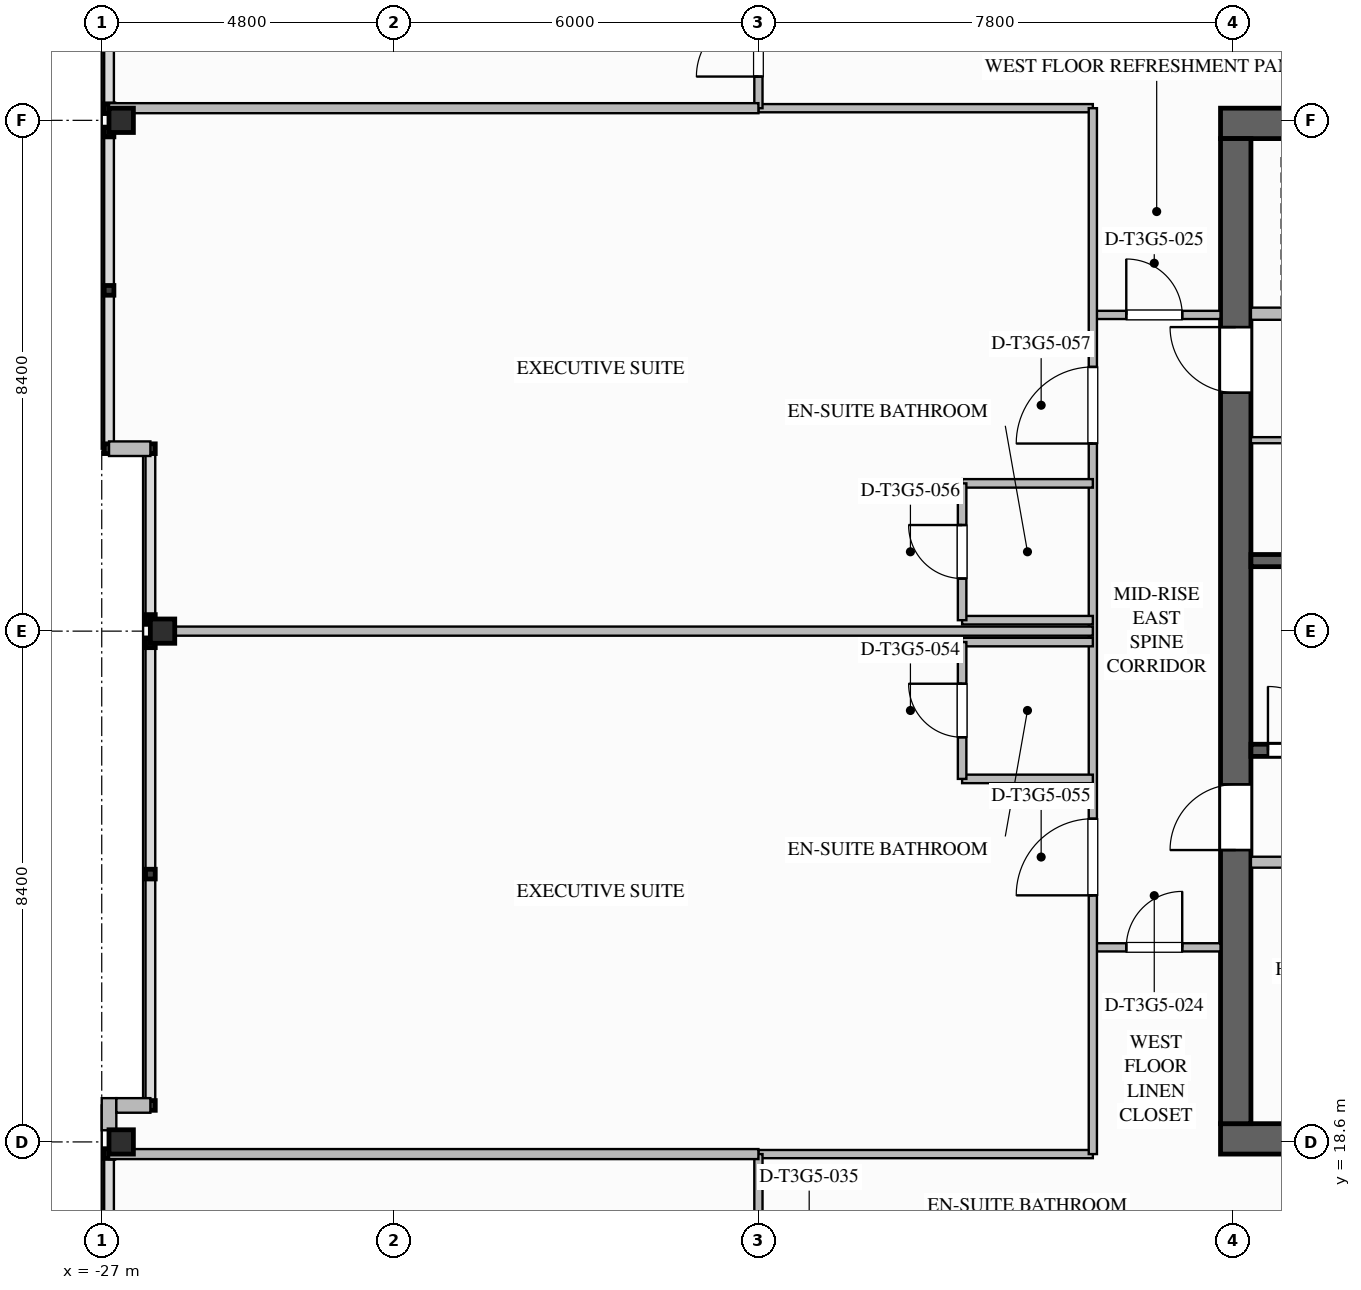
"""IFC4 building model, lengths in metres.
Left out: names, types, materials, properties, quantities, classifications, styles, units other than length and angle.
Written with IfcOpenShell. Run it as: python <this file> out.ifc"""

import sys

from ifc_helpers import new_model, si_unit, direction, frame, frame_2d, origin, origin_2d, place, context, subcontext, project, spatial, rectangle, i_section, extrude, element, fill, save


model = new_model("IFC4")
c1 = context("Model", 3, precision=1e-05, world=origin(), true_north=direction((0.0, 1.0)))
c2 = subcontext(c1, "Body", "Model", "MODEL_VIEW")
j1 = project(units=[si_unit("LENGTHUNIT", "METRE"), si_unit("PLANEANGLEUNIT", "RADIAN")], contexts=[c1])
p1 = place(None, origin())
s1 = spatial("IfcSite", under=j1, at=p1, CompositionType="ELEMENT")
p2 = place(p1, origin())
s2 = spatial("IfcBuilding", under=s1, at=p2, CompositionType="ELEMENT")
p3 = place(p2, frame((0.0, 0.0, 193.0)))
s3 = spatial("IfcBuildingStorey", under=s2, at=p3, CompositionType="ELEMENT", Elevation=193.0)
for number, where, z_axis, x_axis in (
    (1, (-8.6, 35.35, 0.0), (0.0, 0.0, 1.0), (1.0, 0.0, 0.0)),
    (2, (8.6, 18.65, 0.0), (0.0, 0.0, 1.0), (-1.0, 0.0, 0.0)),
):
    element("IfcWall", number, at=place(p3, frame(where, z_axis=z_axis, x_axis=x_axis)), inside=s3, PredefinedType="SHEAR", context=c2, shape_type="SweptSolid", body=[
        extrude(rectangle(XDim=17.2, YDim=0.5, at=frame_2d((8.6, 0.0))), origin(), (0.0, 0.0, 1.0), 3.55),
    ])
p4 = place(p3, frame((-8.35, 18.9, 0.0), z_axis=(0.0, 0.0, 1.0), x_axis=(0.0, 1.0, 0.0)))
e3 = element("IfcWall", 3, at=p4, inside=s3, PredefinedType="SHEAR", context=c2, shape_type="SweptSolid", body=[
    extrude(rectangle(XDim=16.2, YDim=0.5, at=frame_2d((8.1, 0.0))), origin(), (0.0, 0.0, 1.0), 3.55),
])
p5 = place(p4, frame((12.02, 0.0, 0.0)))
e4 = element("IfcOpeningElement", 4, at=p5, cuts=e3, PredefinedType="OPENING", context=c2, shape_type="SweptSolid", body=[
    extrude(rectangle(XDim=1.08, YDim=2.04, at=frame_2d((0.54, 1.02))), frame((0.0, 0.26, 0.0), z_axis=(0.0, -1.0, 0.0), x_axis=(1.0, 0.0, 0.0)), (0.0, 0.0, 1.0), 0.52),
])
p6 = place(p4, frame((4.5, 0.0, 0.0)))
e5 = element("IfcOpeningElement", 5, at=p6, cuts=e3, PredefinedType="OPENING", context=c2, shape_type="SweptSolid", body=[
    extrude(rectangle(XDim=1.08, YDim=2.04, at=frame_2d((0.54, 1.02))), frame((0.0, 0.26, 0.0), z_axis=(0.0, -1.0, 0.0), x_axis=(1.0, 0.0, 0.0)), (0.0, 0.0, 1.0), 0.52),
])
for number, where, z_axis, x_axis in (
    (6, (-26.68, 18.6, 0.0), (0.0, 0.0, 1.0), (1.0, 0.0, 0.0)),
    (7, (-26.0, 27.0, 0.0), (0.0, 0.0, 1.0), (1.0, 0.0, 0.0)),
    (8, (-26.68, 35.4, 0.0), (0.0, 0.0, 1.0), (1.0, 0.0, 0.0)),
):
    element("IfcColumn", number, at=place(p3, frame(where, z_axis=z_axis, x_axis=x_axis)), inside=s3, PredefinedType="COLUMN", context=c2, shape_type="SweptSolid", body=[
        extrude(i_section(OverallWidth=0.401, OverallDepth=0.399, WebThickness=0.025, FlangeThickness=0.04, FilletRadius=0.025, at=origin_2d()), origin(), (0.0, 0.0, 1.0), 3.547),
    ])
p7 = place(p3, frame((-26.88, 18.792, 0.0), z_axis=(0.0, 0.0, 1.0), x_axis=(0.0, 1.0, 0.0)))
e9 = element("IfcWall", 9, at=p7, inside=s3, PredefinedType="STANDARD", context=c2, shape_type="SweptSolid", body=[
    extrude(rectangle(XDim=0.528, YDim=0.24, at=frame_2d((0.264, 0.0))), origin(), (0.0, 0.0, 1.0), 3.29),
])
p8 = place(p3, frame((-26.76, 19.2, 0.0), z_axis=(0.0, 0.0, 1.0), x_axis=(1.0, 0.0, 0.0)))
e10 = element("IfcWall", 10, at=p8, inside=s3, PredefinedType="STANDARD", context=c2, shape_type="SweptSolid", body=[
    extrude(rectangle(XDim=0.56, YDim=0.24, at=frame_2d((0.28, 0.0))), origin(), (0.0, 0.0, 1.0), 3.29),
])
p9 = place(p3, frame((-26.2, 30.0, 0.0), z_axis=(0.0, 0.0, 1.0), x_axis=(-1.0, 0.0, 0.0)))
e11 = element("IfcWall", 11, at=p9, inside=s3, PredefinedType="STANDARD", context=c2, shape_type="SweptSolid", body=[
    extrude(rectangle(XDim=0.68, YDim=0.24, at=frame_2d((0.34, 0.0))), origin(), (0.0, 0.0, 1.0), 3.29),
])
p10 = place(p3, frame((-8.1, 25.04, 0.0), z_axis=(0.0, 0.0, 1.0), x_axis=(1.0, 0.0, 0.0)))
e12 = element("IfcWall", 12, at=p10, inside=s3, PredefinedType="SOLIDWALL", context=c2, shape_type="SweptSolid", body=[
    extrude(rectangle(XDim=8.1, YDim=0.2, at=frame_2d((4.05, 0.0))), origin(), (0.0, 0.0, 1.0), 3.29),
])
p11 = place(p10, frame((0.28, 0.0, 0.0)))
e13 = element("IfcOpeningElement", 13, at=p11, cuts=e12, PredefinedType="OPENING", context=c2, shape_type="SweptSolid", body=[
    extrude(rectangle(XDim=1.05, YDim=2.1, at=frame_2d((0.525, 1.05))), frame((0.0, 0.11, 0.0), z_axis=(0.0, -1.0, 0.0), x_axis=(1.0, 0.0, 0.0)), (0.0, 0.0, 1.0), 0.22),
])
p12 = place(p3, frame((-8.1, 28.16, 0.0), z_axis=(0.0, 0.0, 1.0), x_axis=(1.0, 0.0, 0.0)))
e14 = element("IfcWall", 14, at=p12, inside=s3, PredefinedType="SOLIDWALL", context=c2, shape_type="SweptSolid", body=[
    extrude(rectangle(XDim=8.1, YDim=0.2, at=frame_2d((4.05, 0.0))), origin(), (0.0, 0.0, 1.0), 3.29),
])
p13 = place(p3, frame((-8.1, 32.22, 0.0), z_axis=(0.0, 0.0, 1.0), x_axis=(1.0, 0.0, 0.0)))
e15 = element("IfcWall", 15, at=p13, inside=s3, PredefinedType="SOLIDWALL", context=c2, shape_type="SweptSolid", body=[
    extrude(rectangle(XDim=7.1, YDim=0.2, at=frame_2d((3.55, 0.0))), origin(), (0.0, 0.0, 1.0), 3.29),
])
p14 = place(p13, frame((0.95, 0.0, 0.0)))
e16 = element("IfcOpeningElement", 16, at=p14, cuts=e15, PredefinedType="OPENING", context=c2, shape_type="SweptSolid", body=[
    extrude(rectangle(XDim=1.1, YDim=2.2, at=frame_2d((0.55, 1.1))), frame((0.0, 0.11, 0.0), z_axis=(0.0, -1.0, 0.0), x_axis=(1.0, 0.0, 0.0)), (0.0, 0.0, 1.0), 0.22),
])
p15 = place(p13, frame((3.27, 0.0, 0.0)))
e17 = element("IfcOpeningElement", 17, at=p15, cuts=e15, PredefinedType="OPENING", context=c2, shape_type="SweptSolid", body=[
    extrude(rectangle(XDim=1.1, YDim=2.2, at=frame_2d((0.55, 1.1))), frame((0.0, 0.11, 0.0), z_axis=(0.0, -1.0, 0.0), x_axis=(1.0, 0.0, 0.0)), (0.0, 0.0, 1.0), 0.22),
])
p16 = place(p13, frame((5.59, 0.0, 0.0)))
e18 = element("IfcOpeningElement", 18, at=p16, cuts=e15, PredefinedType="OPENING", context=c2, shape_type="SweptSolid", body=[
    extrude(rectangle(XDim=1.1, YDim=2.2, at=frame_2d((0.55, 1.1))), frame((0.0, 0.11, 0.0), z_axis=(0.0, -1.0, 0.0), x_axis=(1.0, 0.0, 0.0)), (0.0, 0.0, 1.0), 0.22),
])
p17 = place(p3, frame((-8.1, 30.14, 0.0), z_axis=(0.0, 0.0, 1.0), x_axis=(1.0, 0.0, 0.0)))
e19 = element("IfcWall", 19, at=p17, inside=s3, PredefinedType="PARTITIONING", context=c2, shape_type="SweptSolid", body=[
    extrude(rectangle(XDim=7.1, YDim=0.1, at=frame_2d((3.55, 0.0))), origin(), (0.0, 0.0, 1.0), 3.29),
])
p18 = place(p17, frame((0.55, 0.0, 0.0)))
e20 = element("IfcOpeningElement", 20, at=p18, cuts=e19, PredefinedType="OPENING", context=c2, shape_type="SweptSolid", body=[
    extrude(rectangle(XDim=0.88, YDim=2.1, at=frame_2d((0.44, 1.05))), frame((0.0, 0.06, 0.0), z_axis=(0.0, -1.0, 0.0), x_axis=(1.0, 0.0, 0.0)), (0.0, 0.0, 1.0), 0.12),
])
p19 = place(p17, frame((3.6, 0.0, 0.0)))
e21 = element("IfcOpeningElement", 21, at=p19, cuts=e19, PredefinedType="OPENING", context=c2, shape_type="SweptSolid", body=[
    extrude(rectangle(XDim=0.92, YDim=2.1, at=frame_2d((0.46, 1.05))), frame((0.0, 0.06, 0.0), z_axis=(0.0, -1.0, 0.0), x_axis=(1.0, 0.0, 0.0)), (0.0, 0.0, 1.0), 0.12),
])
p20 = place(p3, frame((-8.1, 23.2, 0.0), z_axis=(0.0, 0.0, 1.0), x_axis=(1.0, 0.0, 0.0)))
e22 = element("IfcWall", 22, at=p20, inside=s3, PredefinedType="SOLIDWALL", context=c2, shape_type="SweptSolid", body=[
    extrude(rectangle(XDim=8.65, YDim=0.18, at=frame_2d((4.325, 0.0))), origin(), (0.0, 0.0, 1.0), 3.29),
])
p21 = place(p20, frame((1.0, 0.0, 0.0)))
e23 = element("IfcOpeningElement", 23, at=p21, cuts=e22, PredefinedType="OPENING", context=c2, shape_type="SweptSolid", body=[
    extrude(rectangle(XDim=1.0, YDim=2.1, at=frame_2d((0.5, 1.05))), frame((0.0, 0.1, 0.0), z_axis=(0.0, -1.0, 0.0), x_axis=(1.0, 0.0, 0.0)), (0.0, 0.0, 1.0), 0.2),
])
p22 = place(p20, frame((4.0, 0.0, 0.0)))
e24 = element("IfcOpeningElement", 24, at=p22, cuts=e22, PredefinedType="OPENING", context=c2, shape_type="SweptSolid", body=[
    extrude(rectangle(XDim=1.0, YDim=2.1, at=frame_2d((0.5, 1.05))), frame((0.0, 0.1, 0.0), z_axis=(0.0, -1.0, 0.0), x_axis=(1.0, 0.0, 0.0)), (0.0, 0.0, 1.0), 0.2),
])
p23 = place(p20, frame((6.8, 0.0, 0.0)))
e25 = element("IfcOpeningElement", 25, at=p23, cuts=e22, PredefinedType="OPENING", context=c2, shape_type="SweptSolid", body=[
    extrude(rectangle(XDim=1.0, YDim=2.1, at=frame_2d((0.5, 1.05))), frame((0.0, 0.1, 0.0), z_axis=(0.0, -1.0, 0.0), x_axis=(1.0, 0.0, 0.0)), (0.0, 0.0, 1.0), 0.2),
])
p24 = place(p3, frame((-10.7, 21.8, 0.0), z_axis=(0.0, 0.0, 1.0), x_axis=(1.0, 0.0, 0.0)))
e26 = element("IfcWall", 26, at=p24, inside=s3, PredefinedType="PARTITIONING", context=c2, shape_type="SweptSolid", body=[
    extrude(rectangle(XDim=2.1, YDim=0.135, at=frame_2d((1.05, 0.0))), origin(), (0.0, 0.0, 1.0), 3.29),
])
p25 = place(p24, frame((0.55, 0.0, 0.0)))
e27 = element("IfcOpeningElement", 27, at=p25, cuts=e26, PredefinedType="OPENING", context=c2, shape_type="SweptSolid", body=[
    extrude(rectangle(XDim=0.92, YDim=2.1, at=frame_2d((0.46, 1.05))), frame((0.0, 0.077, 0.0), z_axis=(0.0, -1.0, 0.0), x_axis=(1.0, 0.0, 0.0)), (0.0, 0.0, 1.0), 0.155),
])
p26 = place(p3, frame((-10.7, 32.2, 0.0), z_axis=(0.0, 0.0, 1.0), x_axis=(1.0, 0.0, 0.0)))
e28 = element("IfcWall", 28, at=p26, inside=s3, PredefinedType="PARTITIONING", context=c2, shape_type="SweptSolid", body=[
    extrude(rectangle(XDim=2.1, YDim=0.135, at=frame_2d((1.05, 0.0))), origin(), (0.0, 0.0, 1.0), 3.29),
])
p27 = place(p26, frame((0.55, 0.0, 0.0)))
e29 = element("IfcOpeningElement", 29, at=p27, cuts=e28, PredefinedType="OPENING", context=c2, shape_type="SweptSolid", body=[
    extrude(rectangle(XDim=0.92, YDim=2.1, at=frame_2d((0.46, 1.05))), frame((0.0, 0.077, 0.0), z_axis=(0.0, -1.0, 0.0), x_axis=(1.0, 0.0, 0.0)), (0.0, 0.0, 1.0), 0.155),
])
for number, where, z_axis, x_axis in (
    (30, (-16.2, 18.4, 0.0), (0.0, 0.0, 1.0), (1.0, 0.0, 0.0)),
    (31, (-16.2, 35.6, 0.0), (0.0, 0.0, 1.0), (1.0, 0.0, 0.0)),
):
    element("IfcWall", number, at=place(p3, frame(where, z_axis=z_axis, x_axis=x_axis)), inside=s3, PredefinedType="PARTITIONING", context=c2, shape_type="SweptSolid", body=[
        extrude(rectangle(XDim=5.5, YDim=0.135, at=frame_2d((2.75, 0.0))), origin(), (0.0, 0.0, 1.0), 2.667),
    ])
p28 = place(p3, frame((-10.7, 18.4, 0.0), z_axis=(0.0, 0.0, 1.0), x_axis=(0.0, 1.0, 0.0)))
e32 = element("IfcWall", 32, at=p28, inside=s3, PredefinedType="PARTITIONING", context=c2, shape_type="SweptSolid", body=[
    extrude(rectangle(XDim=17.2, YDim=0.135, at=frame_2d((8.6, 0.0))), origin(), (0.0, 0.0, 1.0), 3.29),
])
p29 = place(p28, frame((4.255, 0.0, 0.0)))
e33 = element("IfcOpeningElement", 33, at=p29, cuts=e32, PredefinedType="OPENING", context=c2, shape_type="SweptSolid", body=[
    extrude(rectangle(XDim=1.26, YDim=2.2, at=frame_2d((0.63, 1.1))), frame((0.0, 0.077, 0.0), z_axis=(0.0, -1.0, 0.0), x_axis=(1.0, 0.0, 0.0)), (0.0, 0.0, 1.0), 0.155),
])
p30 = place(p28, frame((11.685, 0.0, 0.0)))
e34 = element("IfcOpeningElement", 34, at=p30, cuts=e32, PredefinedType="OPENING", context=c2, shape_type="SweptSolid", body=[
    extrude(rectangle(XDim=1.26, YDim=2.2, at=frame_2d((0.63, 1.1))), frame((0.0, 0.077, 0.0), z_axis=(0.0, -1.0, 0.0), x_axis=(1.0, 0.0, 0.0)), (0.0, 0.0, 1.0), 0.155),
])
p31 = place(p3, frame((-16.2, 15.8, 0.0), z_axis=(0.0, 0.0, 1.0), x_axis=(0.0, 1.0, 0.0)))
e35 = element("IfcWall", 35, at=p31, inside=s3, PredefinedType="PARTITIONING", context=c2, shape_type="SweptSolid", body=[
    extrude(rectangle(XDim=2.6, YDim=0.135, at=frame_2d((1.3, 0.0))), origin(), (0.0, 0.0, 1.0), 2.58),
])
p32 = place(p31, frame((0.52, 0.0, 0.0)))
e36 = element("IfcOpeningElement", 36, at=p32, cuts=e35, PredefinedType="OPENING", context=c2, shape_type="SweptSolid", body=[
    extrude(rectangle(XDim=1.02, YDim=2.15, at=frame_2d((0.51, 1.075))), frame((0.0, 0.077, 0.0), z_axis=(0.0, -1.0, 0.0), x_axis=(1.0, 0.0, 0.0)), (0.0, 0.0, 1.0), 0.155),
])
p33 = place(p3, frame((-16.2, 35.6, 0.0), z_axis=(0.0, 0.0, 1.0), x_axis=(0.0, 1.0, 0.0)))
e37 = element("IfcWall", 37, at=p33, inside=s3, PredefinedType="PARTITIONING", context=c2, shape_type="SweptSolid", body=[
    extrude(rectangle(XDim=2.6, YDim=0.135, at=frame_2d((1.3, 0.0))), origin(), (0.0, 0.0, 1.0), 2.58),
])
p34 = place(p33, frame((0.52, 0.0, 0.0)))
e38 = element("IfcOpeningElement", 38, at=p34, cuts=e37, PredefinedType="OPENING", context=c2, shape_type="SweptSolid", body=[
    extrude(rectangle(XDim=1.02, YDim=2.15, at=frame_2d((0.51, 1.075))), frame((0.0, 0.077, 0.0), z_axis=(0.0, -1.0, 0.0), x_axis=(1.0, 0.0, 0.0)), (0.0, 0.0, 1.0), 0.155),
])
for number, where, z_axis, x_axis in (
    (39, (-26.88, 18.4, 0.0), (0.0, 0.0, 1.0), (1.0, 0.0, 0.0)),
    (40, (-26.88, 35.6, 0.0), (0.0, 0.0, 1.0), (1.0, 0.0, 0.0)),
):
    element("IfcWall", number, at=place(p3, frame(where, z_axis=z_axis, x_axis=x_axis)), inside=s3, PredefinedType="PARTITIONING", context=c2, shape_type="SweptSolid", body=[
        extrude(rectangle(XDim=10.68, YDim=0.165, at=frame_2d((5.34, 0.0))), origin(), (0.0, 0.0, 1.0), 2.58),
    ])
p35 = place(p3, frame((-26.2, 27.0, 0.0), z_axis=(0.0, 0.0, 1.0), x_axis=(1.0, 0.0, 0.0)))
e41 = element("IfcWall", 41, at=p35, inside=s3, PredefinedType="PARTITIONING", context=c2, shape_type="SweptSolid", body=[
    extrude(rectangle(XDim=15.5, YDim=0.15, at=frame_2d((7.75, 0.0))), origin(), (0.0, 0.0, 1.0), 2.58),
])
p36 = place(p3, frame((-10.7, 24.57, 0.0), z_axis=(0.0, 0.0, 1.0), x_axis=(-1.0, 0.0, 0.0)))
e42 = element("IfcWall", 42, at=p36, inside=s3, PredefinedType="PLUMBINGWALL", context=c2, shape_type="SweptSolid", body=[
    extrude(rectangle(XDim=2.15, YDim=0.14, at=frame_2d((1.075, 0.0))), origin(), (0.0, 0.0, 1.0), 3.29),
])
p37 = place(p3, frame((-10.7, 26.82, 0.0), z_axis=(0.0, 0.0, 1.0), x_axis=(-1.0, 0.0, 0.0)))
e43 = element("IfcWall", 43, at=p37, inside=s3, PredefinedType="PLUMBINGWALL", context=c2, shape_type="SweptSolid", body=[
    extrude(rectangle(XDim=2.15, YDim=0.14, at=frame_2d((1.075, 0.0))), origin(), (0.0, 0.0, 1.0), 2.667),
])
p38 = place(p3, frame((-12.85, 24.57, 0.0), z_axis=(0.0, 0.0, 1.0), x_axis=(0.0, 1.0, 0.0)))
e44 = element("IfcWall", 44, at=p38, inside=s3, PredefinedType="PLUMBINGWALL", context=c2, shape_type="SweptSolid", body=[
    extrude(rectangle(XDim=2.25, YDim=0.14, at=frame_2d((1.125, 0.0))), origin(), (0.0, 0.0, 1.0), 3.29),
])
p39 = place(p38, frame((0.685, 0.0, 0.0)))
e45 = element("IfcOpeningElement", 45, at=p39, cuts=e44, PredefinedType="OPENING", context=c2, shape_type="SweptSolid", body=[
    extrude(rectangle(XDim=0.88, YDim=2.1, at=frame_2d((0.44, 1.05))), frame((0.0, 0.08, 0.0), z_axis=(0.0, -1.0, 0.0), x_axis=(1.0, 0.0, 0.0)), (0.0, 0.0, 1.0), 0.16),
])
p40 = place(p3, frame((-10.7, 27.18, 0.0), z_axis=(0.0, 0.0, 1.0), x_axis=(-1.0, 0.0, 0.0)))
e46 = element("IfcWall", 46, at=p40, inside=s3, PredefinedType="PLUMBINGWALL", context=c2, shape_type="SweptSolid", body=[
    extrude(rectangle(XDim=2.15, YDim=0.14, at=frame_2d((1.075, 0.0))), origin(), (0.0, 0.0, 1.0), 2.667),
])
p41 = place(p3, frame((-10.7, 29.43, 0.0), z_axis=(0.0, 0.0, 1.0), x_axis=(-1.0, 0.0, 0.0)))
e47 = element("IfcWall", 47, at=p41, inside=s3, PredefinedType="PLUMBINGWALL", context=c2, shape_type="SweptSolid", body=[
    extrude(rectangle(XDim=2.15, YDim=0.14, at=frame_2d((1.075, 0.0))), origin(), (0.0, 0.0, 1.0), 3.29),
])
p42 = place(p3, frame((-12.85, 27.18, 0.0), z_axis=(0.0, 0.0, 1.0), x_axis=(0.0, 1.0, 0.0)))
e48 = element("IfcWall", 48, at=p42, inside=s3, PredefinedType="PLUMBINGWALL", context=c2, shape_type="SweptSolid", body=[
    extrude(rectangle(XDim=2.25, YDim=0.14, at=frame_2d((1.125, 0.0))), origin(), (0.0, 0.0, 1.0), 3.29),
])
p43 = place(p42, frame((0.685, 0.0, 0.0)))
e49 = element("IfcOpeningElement", 49, at=p43, cuts=e48, PredefinedType="OPENING", context=c2, shape_type="SweptSolid", body=[
    extrude(rectangle(XDim=0.88, YDim=2.1, at=frame_2d((0.44, 1.05))), frame((0.0, 0.08, 0.0), z_axis=(0.0, -1.0, 0.0), x_axis=(1.0, 0.0, 0.0)), (0.0, 0.0, 1.0), 0.16),
])
p44 = place(p11, origin())
e50 = element("IfcDoor", 50, at=p44, inside=s3, OperationType="SINGLE_SWING_LEFT", PredefinedType="DOOR", context=c2, shape_type="SweptSolid", body=[
    extrude(rectangle(XDim=1.05, YDim=2.1, at=frame_2d((0.525, 1.05))), frame((0.0, 0.025, 0.0), z_axis=(0.0, -1.0, 0.0), x_axis=(1.0, 0.0, 0.0)), (0.0, 0.0, 1.0), 0.05),
])
fill(e13, e50)
p45 = place(p5, origin())
e51 = element("IfcDoor", 51, at=p45, inside=s3, OperationType="SINGLE_SWING_RIGHT", PredefinedType="DOOR", context=c2, shape_type="SweptSolid", body=[
    extrude(rectangle(XDim=1.08, YDim=2.04, at=frame_2d((0.54, 1.02))), frame((0.0, 0.025, 0.0), z_axis=(0.0, -1.0, 0.0), x_axis=(1.0, 0.0, 0.0)), (0.0, 0.0, 1.0), 0.05),
])
fill(e4, e51)
p46 = place(p6, origin())
e52 = element("IfcDoor", 52, at=p46, inside=s3, OperationType="SINGLE_SWING_LEFT", PredefinedType="DOOR", context=c2, shape_type="SweptSolid", body=[
    extrude(rectangle(XDim=1.08, YDim=2.04, at=frame_2d((0.54, 1.02))), frame((0.0, 0.025, 0.0), z_axis=(0.0, -1.0, 0.0), x_axis=(1.0, 0.0, 0.0)), (0.0, 0.0, 1.0), 0.05),
])
fill(e5, e52)
p47 = place(p25, origin())
e53 = element("IfcDoor", 53, at=p47, inside=s3, OperationType="SINGLE_SWING_RIGHT", PredefinedType="DOOR", context=c2, shape_type="SweptSolid", body=[
    extrude(rectangle(XDim=0.92, YDim=2.1, at=frame_2d((0.46, 1.05))), frame((0.0, 0.025, 0.0), z_axis=(0.0, -1.0, 0.0), x_axis=(1.0, 0.0, 0.0)), (0.0, 0.0, 1.0), 0.05),
])
fill(e27, e53)
p48 = place(p27, origin())
e54 = element("IfcDoor", 54, at=p48, inside=s3, OperationType="SINGLE_SWING_LEFT", PredefinedType="DOOR", context=c2, shape_type="SweptSolid", body=[
    extrude(rectangle(XDim=0.92, YDim=2.1, at=frame_2d((0.46, 1.05))), frame((0.0, 0.025, 0.0), z_axis=(0.0, -1.0, 0.0), x_axis=(1.0, 0.0, 0.0)), (0.0, 0.0, 1.0), 0.05),
])
fill(e29, e54)
p49 = place(p34, origin())
e55 = element("IfcDoor", 55, at=p49, inside=s3, OperationType="SINGLE_SWING_LEFT", PredefinedType="DOOR", context=c2, shape_type="SweptSolid", body=[
    extrude(rectangle(XDim=1.02, YDim=2.15, at=frame_2d((0.51, 1.075))), frame((0.0, 0.025, 0.0), z_axis=(0.0, -1.0, 0.0), x_axis=(1.0, 0.0, 0.0)), (0.0, 0.0, 1.0), 0.05),
])
fill(e38, e55)
p50 = place(p39, origin())
e56 = element("IfcDoor", 56, at=p50, inside=s3, OperationType="SINGLE_SWING_RIGHT", PredefinedType="DOOR", context=c2, shape_type="SweptSolid", body=[
    extrude(rectangle(XDim=0.88, YDim=2.1, at=frame_2d((0.44, 1.05))), frame((0.0, 0.025, 0.0), z_axis=(0.0, -1.0, 0.0), x_axis=(1.0, 0.0, 0.0)), (0.0, 0.0, 1.0), 0.05),
])
fill(e45, e56)
p51 = place(p29, origin())
e57 = element("IfcDoor", 57, at=p51, inside=s3, OperationType="SINGLE_SWING_LEFT", PredefinedType="DOOR", context=c2, shape_type="SweptSolid", body=[
    extrude(rectangle(XDim=1.26, YDim=2.2, at=frame_2d((0.63, 1.1))), frame((0.0, 0.025, 0.0), z_axis=(0.0, -1.0, 0.0), x_axis=(1.0, 0.0, 0.0)), (0.0, 0.0, 1.0), 0.05),
])
fill(e33, e57)
p52 = place(p43, origin())
e58 = element("IfcDoor", 58, at=p52, inside=s3, OperationType="SINGLE_SWING_RIGHT", PredefinedType="DOOR", context=c2, shape_type="SweptSolid", body=[
    extrude(rectangle(XDim=0.88, YDim=2.1, at=frame_2d((0.44, 1.05))), frame((0.0, 0.025, 0.0), z_axis=(0.0, -1.0, 0.0), x_axis=(1.0, 0.0, 0.0)), (0.0, 0.0, 1.0), 0.05),
])
fill(e49, e58)
p53 = place(p30, origin())
e59 = element("IfcDoor", 59, at=p53, inside=s3, OperationType="SINGLE_SWING_LEFT", PredefinedType="DOOR", context=c2, shape_type="SweptSolid", body=[
    extrude(rectangle(XDim=1.26, YDim=2.2, at=frame_2d((0.63, 1.1))), frame((0.0, 0.025, 0.0), z_axis=(0.0, -1.0, 0.0), x_axis=(1.0, 0.0, 0.0)), (0.0, 0.0, 1.0), 0.05),
])
fill(e34, e59)
save(model, sys.argv[1])
